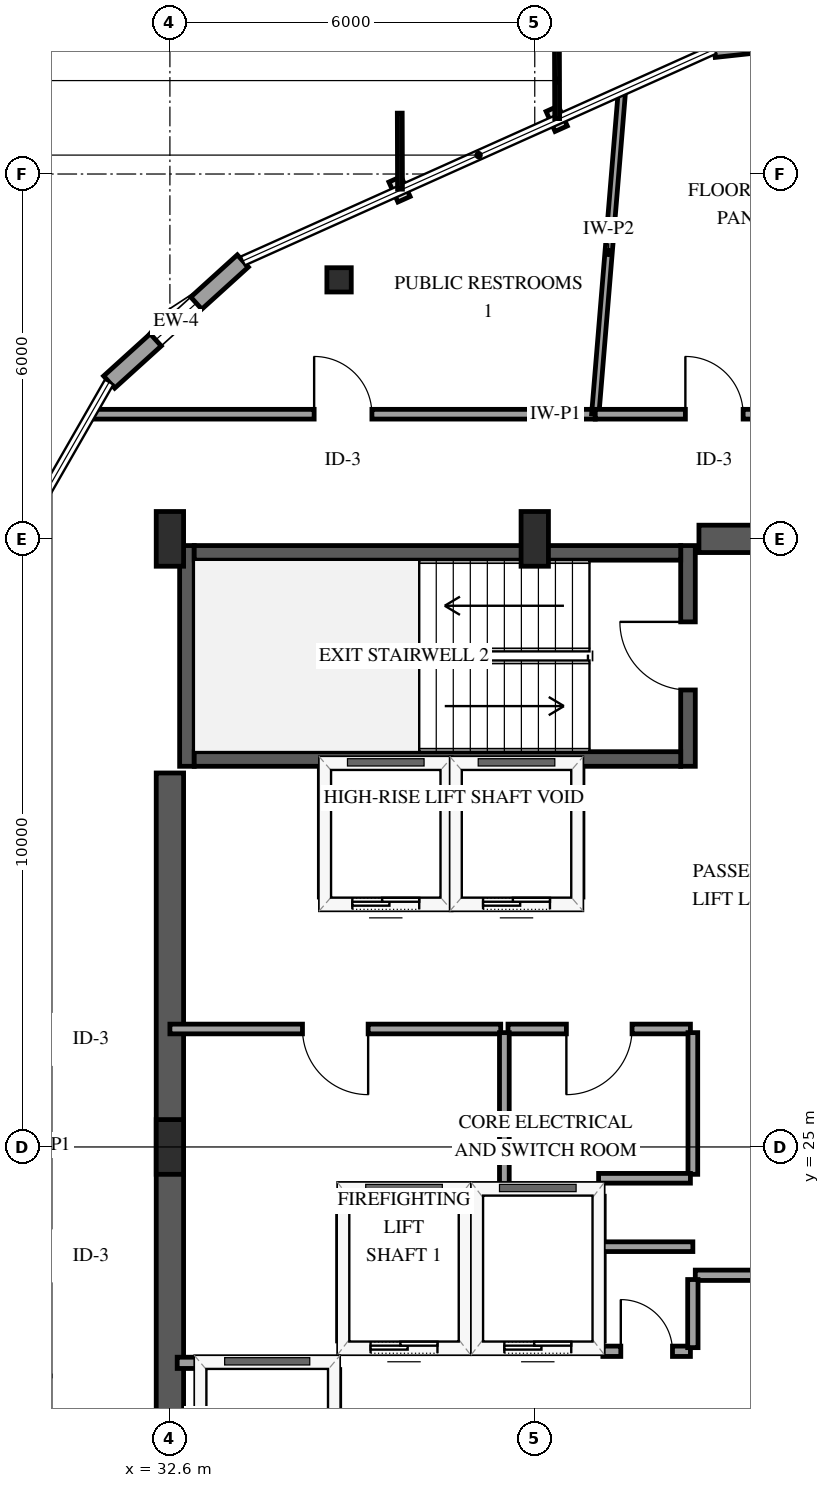
"""IFC4 building model, lengths in metres.
Left out: names, types, materials, properties, quantities, classifications, styles, units other than length and angle.
Written with IfcOpenShell. Run it as: python <this file> out.ifc"""

import sys

from ifc_helpers import new_model, si_unit, direction, frame, frame_2d, origin, origin_2d, place, context, subcontext, project, spatial, rectangle, i_section, extrude, element, fill, save


model = new_model("IFC4")
c1 = context("Model", 3, precision=1e-05, world=origin(), true_north=direction((0.0, 1.0)))
c2 = subcontext(c1, "Body", "Model", "MODEL_VIEW")
j1 = project(units=[si_unit("LENGTHUNIT", "METRE"), si_unit("PLANEANGLEUNIT", "RADIAN")], contexts=[c1])
p1 = place(None, origin())
s1 = spatial("IfcSite", under=j1, at=p1, CompositionType="ELEMENT")
p2 = place(p1, origin())
s2 = spatial("IfcBuilding", under=s1, at=p2, CompositionType="ELEMENT")
p3 = place(p2, frame((0.0, 0.0, 253.75)))
s3 = spatial("IfcBuildingStorey", under=s2, at=p3, CompositionType="ELEMENT", Elevation=253.75)
p4 = place(p3, frame((32.88, 31.26, 0.0), z_axis=(0.0, 0.0, 1.0), x_axis=(0.0, 1.0, 0.0)))
e1 = element("IfcWall", 1, at=p4, inside=s3, PredefinedType="SHEAR", context=c2, shape_type="SweptSolid", body=[
    extrude(rectangle(XDim=3.63, YDim=0.24, at=frame_2d((1.815, 0.0))), origin(), (0.0, 0.0, 1.0), 3.75),
])
p5 = place(p3, frame((41.12, 31.26, 0.0), z_axis=(0.0, 0.0, 1.0), x_axis=(0.0, 1.0, 0.0)))
e2 = element("IfcWall", 2, at=p5, inside=s3, PredefinedType="SHEAR", context=c2, shape_type="SweptSolid", body=[
    extrude(rectangle(XDim=3.63, YDim=0.24, at=frame_2d((1.815, 0.0))), origin(), (0.0, 0.0, 1.0), 3.75),
])
p6 = place(p5, frame((1.255, 0.0, 0.0)))
e3 = element("IfcOpeningElement", 3, at=p6, cuts=e2, PredefinedType="OPENING", context=c2, shape_type="SweptSolid", body=[
    extrude(rectangle(XDim=1.12, YDim=2.15, at=frame_2d((0.56, 1.075))), frame((0.0, 0.13, 0.0), z_axis=(0.0, -1.0, 0.0), x_axis=(1.0, 0.0, 0.0)), (0.0, 0.0, 1.0), 0.26),
])
for number, where, z_axis, x_axis in (
    (4, (33.0, 31.38, 0.0), (0.0, 0.0, 1.0), (1.0, 0.0, 0.0)),
    (5, (33.0, 34.77, 0.0), (0.0, 0.0, 1.0), (1.0, 0.0, 0.0)),
):
    element("IfcWall", number, at=place(p3, frame(where, z_axis=z_axis, x_axis=x_axis)), inside=s3, PredefinedType="SHEAR", context=c2, shape_type="SweptSolid", body=[
        extrude(rectangle(XDim=8.0, YDim=0.24, at=frame_2d((4.0, 0.0))), origin(), (0.0, 0.0, 1.0), 3.75),
    ])
p7 = place(p3, frame((32.6, 18.85, 0.0), z_axis=(0.0, 0.0, 1.0), x_axis=(0.0, 1.0, 0.0)))
e6 = element("IfcWall", 6, at=p7, inside=s3, PredefinedType="SHEAR", context=c2, shape_type="SweptSolid", body=[
    extrude(rectangle(XDim=12.3, YDim=0.45, at=frame_2d((6.15, 0.0))), origin(), (0.0, 0.0, 1.0), 3.75),
])
p8 = place(p3, frame((41.3, 35.0, 0.0), z_axis=(0.0, 0.0, 1.0), x_axis=(1.0, 0.0, 0.0)))
e7 = element("IfcWall", 7, at=p8, inside=s3, PredefinedType="SHEAR", context=c2, shape_type="SweptSolid", body=[
    extrude(rectangle(XDim=2.85, YDim=0.45, at=frame_2d((1.425, 0.0))), origin(), (0.0, 0.0, 1.0), 3.75),
])
for number, where, z_axis, x_axis in (
    (8, (32.6, 25.0, 0.0), (0.0, 0.0, 1.0), (1.0, 0.0, 0.0)),
    (9, (32.6, 35.0, 0.0), (0.0, 0.0, 1.0), (1.0, 0.0, 0.0)),
    (10, (38.6, 35.0, 0.0), (0.0, 0.0, 1.0), (1.0, 0.0, 0.0)),
):
    element("IfcColumn", number, at=place(p3, frame(where, z_axis=z_axis, x_axis=x_axis)), inside=s3, PredefinedType="PILASTER", context=c2, shape_type="SweptSolid", body=[
        extrude(rectangle(XDim=0.45, YDim=0.9, at=origin_2d()), origin(), (0.0, 0.0, 1.0), 3.75),
    ])
p9 = place(p3, frame((35.382, 39.26, 0.0), z_axis=(0.0, 0.0, 1.0), x_axis=(1.0, 0.0, 0.0)))
e11 = element("IfcColumn", 11, at=p9, inside=s3, PredefinedType="COLUMN", context=c2, shape_type="SweptSolid", body=[
    extrude(i_section(OverallWidth=0.401, OverallDepth=0.399, WebThickness=0.025, FlangeThickness=0.04, FilletRadius=0.038, at=origin_2d()), origin(), (0.0, 0.0, 1.0), 3.75),
])
p10 = place(p3, frame((44.503, 43.371, 0.0), z_axis=(0.0, 0.0, 1.0), x_axis=(-0.994188969029, -0.107648938037, 0.0)))
e12 = element("IfcWall", 12, at=p10, inside=s3, PredefinedType="SOLIDWALL", context=c2, shape_type="SweptSolid", body=[
    extrude(rectangle(XDim=2.967, YDim=0.27, at=frame_2d((1.483, 0.0))), origin(), (0.0, 0.0, 1.0), 2.829),
])
p11 = place(p10, frame((1.033, 0.0, 0.75)))
e13 = element("IfcOpeningElement", 13, at=p11, cuts=e12, PredefinedType="OPENING", context=c2, shape_type="SweptSolid", body=[
    extrude(rectangle(XDim=0.9, YDim=1.5, at=frame_2d((0.45, 0.75))), frame((0.0, 0.145, 0.0), z_axis=(0.0, -1.0, 0.0), x_axis=(1.0, 0.0, 0.0)), (0.0, 0.0, 1.0), 0.29),
])
p12 = place(p3, frame((33.799, 39.57, 0.0), z_axis=(0.0, 0.0, 1.0), x_axis=(-0.741022782564, -0.671479884822, 0.0)))
e14 = element("IfcWall", 14, at=p12, inside=s3, PredefinedType="SOLIDWALL", context=c2, shape_type="SweptSolid", body=[
    extrude(rectangle(XDim=2.967, YDim=0.27, at=frame_2d((1.483, 0.0))), origin(), (0.0, 0.0, 1.0), 2.829),
])
p13 = place(p12, frame((1.033, 0.0, 0.75)))
e15 = element("IfcOpeningElement", 15, at=p13, cuts=e14, PredefinedType="OPENING", context=c2, shape_type="SweptSolid", body=[
    extrude(rectangle(XDim=0.9, YDim=1.5, at=frame_2d((0.45, 0.75))), frame((0.0, 0.145, 0.0), z_axis=(0.0, -1.0, 0.0), x_axis=(1.0, 0.0, 0.0)), (0.0, 0.0, 1.0), 0.29),
])
p14 = place(p3, frame((35.45, 21.7, 0.0), z_axis=(0.0, 0.0, 1.0), x_axis=(1.0, 0.0, 0.0)))
e16 = element("IfcWall", 16, at=p14, inside=s3, PredefinedType="SOLIDWALL", context=c2, shape_type="SweptSolid", body=[
    extrude(rectangle(XDim=2.0, YDim=0.185, at=frame_2d((1.0, 0.0))), origin(), (0.0, 0.0, 1.0), 2.824),
])
p15 = place(p14, frame((0.45, 0.0, 0.0)))
e17 = element("IfcOpeningElement", 17, at=p15, cuts=e16, PredefinedType="OPENING", context=c2, shape_type="SweptSolid", body=[
    extrude(rectangle(XDim=1.1, YDim=2.15, at=frame_2d((0.55, 1.075))), frame((0.0, 0.103, 0.0), z_axis=(0.0, -1.0, 0.0), x_axis=(1.0, 0.0, 0.0)), (0.0, 0.0, 1.0), 0.205),
])
p16 = place(p3, frame((35.45, 24.3, 0.0), z_axis=(0.0, 0.0, 1.0), x_axis=(1.0, 0.0, 0.0)))
e18 = element("IfcWall", 18, at=p16, inside=s3, PredefinedType="SOLIDWALL", context=c2, shape_type="SweptSolid", body=[
    extrude(rectangle(XDim=2.0, YDim=0.185, at=frame_2d((1.0, 0.0))), origin(), (0.0, 0.0, 1.0), 2.824),
])
for number, where, z_axis, x_axis in (
    (19, (35.45, 21.81, 0.0), (0.0, 0.0, 1.0), (0.0, 1.0, 0.0)),
    (20, (37.45, 21.81, 0.0), (0.0, 0.0, 1.0), (0.0, 1.0, 0.0)),
):
    element("IfcWall", number, at=place(p3, frame(where, z_axis=z_axis, x_axis=x_axis)), inside=s3, PredefinedType="SOLIDWALL", context=c2, shape_type="SweptSolid", body=[
        extrude(rectangle(XDim=2.38, YDim=0.185, at=frame_2d((1.19, 0.0))), origin(), (0.0, 0.0, 1.0), 3.45),
    ])
p17 = place(p3, frame((37.65, 21.7, 0.0), z_axis=(0.0, 0.0, 1.0), x_axis=(1.0, 0.0, 0.0)))
e21 = element("IfcWall", 21, at=p17, inside=s3, PredefinedType="SOLIDWALL", context=c2, shape_type="SweptSolid", body=[
    extrude(rectangle(XDim=2.0, YDim=0.185, at=frame_2d((1.0, 0.0))), origin(), (0.0, 0.0, 1.0), 2.824),
])
p18 = place(p17, frame((0.45, 0.0, 0.0)))
e22 = element("IfcOpeningElement", 22, at=p18, cuts=e21, PredefinedType="OPENING", context=c2, shape_type="SweptSolid", body=[
    extrude(rectangle(XDim=1.1, YDim=2.15, at=frame_2d((0.55, 1.075))), frame((0.0, 0.103, 0.0), z_axis=(0.0, -1.0, 0.0), x_axis=(1.0, 0.0, 0.0)), (0.0, 0.0, 1.0), 0.205),
])
p19 = place(p3, frame((37.65, 24.3, 0.0), z_axis=(0.0, 0.0, 1.0), x_axis=(1.0, 0.0, 0.0)))
e23 = element("IfcWall", 23, at=p19, inside=s3, PredefinedType="SOLIDWALL", context=c2, shape_type="SweptSolid", body=[
    extrude(rectangle(XDim=2.0, YDim=0.185, at=frame_2d((1.0, 0.0))), origin(), (0.0, 0.0, 1.0), 2.824),
])
p20 = place(p3, frame((39.65, 21.81, 0.0), z_axis=(0.0, 0.0, 1.0), x_axis=(0.0, 1.0, 0.0)))
e24 = element("IfcWall", 24, at=p20, inside=s3, PredefinedType="SOLIDWALL", context=c2, shape_type="SweptSolid", body=[
    extrude(rectangle(XDim=2.38, YDim=0.185, at=frame_2d((1.19, 0.0))), origin(), (0.0, 0.0, 1.0), 3.45),
])
p21 = place(p3, frame((32.72, 21.45, 0.0), z_axis=(0.0, 0.0, 1.0), x_axis=(1.0, 0.0, 0.0)))
e25 = element("IfcWall", 25, at=p21, inside=s3, PredefinedType="SOLIDWALL", context=c2, shape_type="SweptSolid", body=[
    extrude(rectangle(XDim=2.58, YDim=0.185, at=frame_2d((1.29, 0.0))), origin(), (0.0, 0.0, 1.0), 2.824),
])
p22 = place(p3, frame((35.3, 18.79, 0.0), z_axis=(0.0, 0.0, 1.0), x_axis=(0.0, 1.0, 0.0)))
e26 = element("IfcWall", 26, at=p22, inside=s3, PredefinedType="SOLIDWALL", context=c2, shape_type="SweptSolid", body=[
    extrude(rectangle(XDim=2.55, YDim=0.185, at=frame_2d((1.275, 0.0))), origin(), (0.0, 0.0, 1.0), 3.45),
])
p23 = place(p22, frame((0.725, 0.0, 0.0)))
e27 = element("IfcOpeningElement", 27, at=p23, cuts=e26, PredefinedType="OPENING", context=c2, shape_type="SweptSolid", body=[
    extrude(rectangle(XDim=1.1, YDim=2.15, at=frame_2d((0.55, 1.075))), frame((0.0, 0.103, 0.0), z_axis=(0.0, -1.0, 0.0), x_axis=(1.0, 0.0, 0.0)), (0.0, 0.0, 1.0), 0.205),
])
p24 = place(p3, frame((35.15, 29.0, 0.0), z_axis=(0.0, 0.0, 1.0), x_axis=(1.0, 0.0, 0.0)))
e28 = element("IfcWall", 28, at=p24, inside=s3, PredefinedType="SOLIDWALL", context=c2, shape_type="SweptSolid", body=[
    extrude(rectangle(XDim=2.0, YDim=0.185, at=frame_2d((1.0, 0.0))), origin(), (0.0, 0.0, 1.0), 3.45),
])
p25 = place(p24, frame((0.45, 0.0, 0.0)))
e29 = element("IfcOpeningElement", 29, at=p25, cuts=e28, PredefinedType="OPENING", context=c2, shape_type="SweptSolid", body=[
    extrude(rectangle(XDim=1.1, YDim=2.15, at=frame_2d((0.55, 1.075))), frame((0.0, 0.103, 0.0), z_axis=(0.0, -1.0, 0.0), x_axis=(1.0, 0.0, 0.0)), (0.0, 0.0, 1.0), 0.205),
])
for number, where, z_axis, x_axis in (
    (30, (35.15, 29.11, 0.0), (0.0, 0.0, 1.0), (0.0, 1.0, 0.0)),
    (31, (37.15, 29.11, 0.0), (0.0, 0.0, 1.0), (0.0, 1.0, 0.0)),
):
    element("IfcWall", number, at=place(p3, frame(where, z_axis=z_axis, x_axis=x_axis)), inside=s3, PredefinedType="SOLIDWALL", context=c2, shape_type="SweptSolid", body=[
        extrude(rectangle(XDim=2.1, YDim=0.185, at=frame_2d((1.05, 0.0))), origin(), (0.0, 0.0, 1.0), 3.45),
    ])
p26 = place(p3, frame((37.3, 29.0, 0.0), z_axis=(0.0, 0.0, 1.0), x_axis=(1.0, 0.0, 0.0)))
e32 = element("IfcWall", 32, at=p26, inside=s3, PredefinedType="SOLIDWALL", context=c2, shape_type="SweptSolid", body=[
    extrude(rectangle(XDim=2.0, YDim=0.185, at=frame_2d((1.0, 0.0))), origin(), (0.0, 0.0, 1.0), 3.45),
])
p27 = place(p26, frame((0.45, 0.0, 0.0)))
e33 = element("IfcOpeningElement", 33, at=p27, cuts=e32, PredefinedType="OPENING", context=c2, shape_type="SweptSolid", body=[
    extrude(rectangle(XDim=1.1, YDim=2.15, at=frame_2d((0.55, 1.075))), frame((0.0, 0.103, 0.0), z_axis=(0.0, -1.0, 0.0), x_axis=(1.0, 0.0, 0.0)), (0.0, 0.0, 1.0), 0.205),
])
p28 = place(p3, frame((39.3, 29.11, 0.0), z_axis=(0.0, 0.0, 1.0), x_axis=(0.0, 1.0, 0.0)))
e34 = element("IfcWall", 34, at=p28, inside=s3, PredefinedType="SOLIDWALL", context=c2, shape_type="SweptSolid", body=[
    extrude(rectangle(XDim=2.1, YDim=0.185, at=frame_2d((1.05, 0.0))), origin(), (0.0, 0.0, 1.0), 3.45),
])
p29 = place(p3, frame((31.298, 37.05, 0.0), z_axis=(0.0, 0.0, 1.0), x_axis=(1.0, 0.0, 0.0)))
e35 = element("IfcWall", 35, at=p29, inside=s3, PredefinedType="PARTITIONING", context=c2, shape_type="SweptSolid", body=[
    extrude(rectangle(XDim=8.297, YDim=0.16, at=frame_2d((4.148, 0.0))), origin(), (0.0, 0.0, 1.0), 3.45),
])
p30 = place(p29, frame((3.674, 0.0, 0.0)))
e36 = element("IfcOpeningElement", 36, at=p30, cuts=e35, PredefinedType="OPENING", context=c2, shape_type="SweptSolid", body=[
    extrude(rectangle(XDim=0.95, YDim=2.15, at=frame_2d((0.475, 1.075))), frame((0.0, 0.09, 0.0), z_axis=(0.0, -1.0, 0.0), x_axis=(1.0, 0.0, 0.0)), (0.0, 0.0, 1.0), 0.18),
])
p31 = place(p3, frame((38.04, 26.94, 0.0), z_axis=(0.0, 0.0, 1.0), x_axis=(-1.0, 0.0, 0.0)))
e37 = element("IfcWall", 37, at=p31, inside=s3, PredefinedType="PARTITIONING", context=c2, shape_type="SweptSolid", body=[
    extrude(rectangle(XDim=5.44, YDim=0.16, at=frame_2d((2.72, 0.0))), origin(), (0.0, 0.0, 1.0), 3.45),
])
p32 = place(p31, frame((2.18, 0.0, 0.0)))
e38 = element("IfcOpeningElement", 38, at=p32, cuts=e37, PredefinedType="OPENING", context=c2, shape_type="SweptSolid", body=[
    extrude(rectangle(XDim=1.08, YDim=2.15, at=frame_2d((0.54, 1.075))), frame((0.0, 0.09, 0.0), z_axis=(0.0, -1.0, 0.0), x_axis=(1.0, 0.0, 0.0)), (0.0, 0.0, 1.0), 0.18),
])
p33 = place(p3, frame((39.595, 37.05, 0.0), z_axis=(0.0, 0.0, 1.0), x_axis=(0.082231683065, 0.996613240079, 0.0)))
e39 = element("IfcWall", 39, at=p33, inside=s3, PredefinedType="PARTITIONING", context=c2, shape_type="SweptSolid", body=[
    extrude(rectangle(XDim=5.338, YDim=0.12, at=frame_2d((2.669, 0.0))), origin(), (0.0, 0.0, 1.0), 3.45),
])
p34 = place(p3, frame((39.595, 37.05, 0.0), z_axis=(0.0, 0.0, 1.0), x_axis=(1.0, 0.0, 0.0)))
e40 = element("IfcWall", 40, at=p34, inside=s3, PredefinedType="PARTITIONING", context=c2, shape_type="SweptSolid", body=[
    extrude(rectangle(XDim=3.913, YDim=0.16, at=frame_2d((1.957, 0.0))), origin(), (0.0, 0.0, 1.0), 3.45),
])
p35 = place(p34, frame((1.482, 0.0, 0.0)))
e41 = element("IfcOpeningElement", 41, at=p35, cuts=e40, PredefinedType="OPENING", context=c2, shape_type="SweptSolid", body=[
    extrude(rectangle(XDim=0.95, YDim=2.15, at=frame_2d((0.475, 1.075))), frame((0.0, 0.09, 0.0), z_axis=(0.0, -1.0, 0.0), x_axis=(1.0, 0.0, 0.0)), (0.0, 0.0, 1.0), 0.18),
])
p36 = place(p3, frame((41.24, 22.89, 0.0), z_axis=(0.0, 0.0, 1.0), x_axis=(1.0, 0.0, 0.0)))
e42 = element("IfcWall", 42, at=p36, inside=s3, PredefinedType="PARTITIONING", context=c2, shape_type="SweptSolid", body=[
    extrude(rectangle(XDim=3.32, YDim=0.17, at=frame_2d((1.66, 0.0))), origin(), (0.0, 0.0, 1.0), 3.45),
])
p37 = place(p36, frame((1.12, 0.0, 0.0)))
e43 = element("IfcOpeningElement", 43, at=p37, cuts=e42, PredefinedType="OPENING", context=c2, shape_type="SweptSolid", body=[
    extrude(rectangle(XDim=1.08, YDim=2.15, at=frame_2d((0.54, 1.075))), frame((0.0, 0.095, 0.0), z_axis=(0.0, -1.0, 0.0), x_axis=(1.0, 0.0, 0.0)), (0.0, 0.0, 1.0), 0.19),
])
p38 = place(p3, frame((41.16, 26.94, 0.0), z_axis=(0.0, 0.0, 1.0), x_axis=(-1.0, 0.0, 0.0)))
e44 = element("IfcWall", 44, at=p38, inside=s3, PredefinedType="PARTITIONING", context=c2, shape_type="SweptSolid", body=[
    extrude(rectangle(XDim=3.0, YDim=0.16, at=frame_2d((1.5, 0.0))), origin(), (0.0, 0.0, 1.0), 3.45),
])
p39 = place(p38, frame((0.96, 0.0, 0.0)))
e45 = element("IfcOpeningElement", 45, at=p39, cuts=e44, PredefinedType="OPENING", context=c2, shape_type="SweptSolid", body=[
    extrude(rectangle(XDim=1.08, YDim=2.15, at=frame_2d((0.54, 1.075))), frame((0.0, 0.09, 0.0), z_axis=(0.0, -1.0, 0.0), x_axis=(1.0, 0.0, 0.0)), (0.0, 0.0, 1.0), 0.18),
])
p40 = place(p3, frame((38.1, 26.88, 0.0), z_axis=(0.0, 0.0, 1.0), x_axis=(0.0, -1.0, 0.0)))
e46 = element("IfcWall", 46, at=p40, inside=s3, PredefinedType="PARTITIONING", context=c2, shape_type="SweptSolid", body=[
    extrude(rectangle(XDim=2.58, YDim=0.16, at=frame_2d((1.29, 0.0))), origin(), (0.0, 0.0, 1.0), 3.45),
])
p41 = place(p3, frame((41.2, 24.55, 0.0), z_axis=(0.0, 0.0, 1.0), x_axis=(0.0, 1.0, 0.0)))
e47 = element("IfcWall", 47, at=p41, inside=s3, PredefinedType="PARTITIONING", context=c2, shape_type="SweptSolid", body=[
    extrude(rectangle(XDim=2.33, YDim=0.16, at=frame_2d((1.165, 0.0))), origin(), (0.0, 0.0, 1.0), 3.45),
])
p42 = place(p3, frame((39.65, 24.485, 0.0), z_axis=(0.0, 0.0, 1.0), x_axis=(1.0, 0.0, 0.0)))
e48 = element("IfcWall", 48, at=p42, inside=s3, PredefinedType="PARTITIONING", context=c2, shape_type="SweptSolid", body=[
    extrude(rectangle(XDim=1.51, YDim=0.16, at=frame_2d((0.755, 0.0))), origin(), (0.0, 0.0, 1.0), 2.824),
])
p43 = place(p3, frame((39.72, 21.64, 0.0), z_axis=(0.0, 0.0, 1.0), x_axis=(1.0, 0.0, 0.0)))
e49 = element("IfcWall", 49, at=p43, inside=s3, PredefinedType="PARTITIONING", context=c2, shape_type="SweptSolid", body=[
    extrude(rectangle(XDim=1.44, YDim=0.17, at=frame_2d((0.72, 0.0))), origin(), (0.0, 0.0, 1.0), 2.824),
])
p44 = place(p43, frame((0.295, 0.0, 0.0)))
e50 = element("IfcOpeningElement", 50, at=p44, cuts=e49, PredefinedType="OPENING", context=c2, shape_type="SweptSolid", body=[
    extrude(rectangle(XDim=0.85, YDim=2.1, at=frame_2d((0.425, 1.05))), frame((0.0, 0.095, 0.0), z_axis=(0.0, -1.0, 0.0), x_axis=(1.0, 0.0, 0.0)), (0.0, 0.0, 1.0), 0.19),
])
p45 = place(p3, frame((41.2, 21.7, 0.0), z_axis=(0.0, 0.0, 1.0), x_axis=(0.0, 1.0, 0.0)))
e51 = element("IfcWall", 51, at=p45, inside=s3, PredefinedType="PARTITIONING", context=c2, shape_type="SweptSolid", body=[
    extrude(rectangle(XDim=1.12, YDim=0.17, at=frame_2d((0.56, 0.0))), origin(), (0.0, 0.0, 1.0), 3.45),
])
p46 = place(p3, frame((41.2, 23.36, 0.0), z_axis=(0.0, 0.0, 1.0), x_axis=(-1.0, 0.0, 0.0)))
e52 = element("IfcWall", 52, at=p46, inside=s3, PredefinedType="PARTITIONING", context=c2, shape_type="SweptSolid", body=[
    extrude(rectangle(XDim=1.48, YDim=0.16, at=frame_2d((0.74, 0.0))), origin(), (0.0, 0.0, 1.0), 3.45),
])
p47 = place(p13, origin())
e53 = element("IfcWindow", 53, at=p47, inside=s3, PartitioningType="SINGLE_PANEL", PredefinedType="WINDOW", context=c2, shape_type="SweptSolid", body=[
    extrude(rectangle(XDim=0.9, YDim=1.5, at=frame_2d((0.45, 0.75))), frame((0.0, 0.03, 0.0), z_axis=(0.0, -1.0, 0.0), x_axis=(1.0, 0.0, 0.0)), (0.0, 0.0, 1.0), 0.06),
])
fill(e15, e53)
p48 = place(p15, origin())
e54 = element("IfcDoor", 54, at=p48, inside=s3, OperationType="SLIDING_TO_LEFT", PredefinedType="DOOR", context=c2, shape_type="SweptSolid", body=[
    extrude(rectangle(XDim=1.1, YDim=2.15, at=frame_2d((0.55, 1.075))), frame((0.0, 0.025, 0.0), z_axis=(0.0, -1.0, 0.0), x_axis=(1.0, 0.0, 0.0)), (0.0, 0.0, 1.0), 0.05),
])
fill(e17, e54)
p49 = place(p18, origin())
e55 = element("IfcDoor", 55, at=p49, inside=s3, OperationType="SLIDING_TO_LEFT", PredefinedType="DOOR", context=c2, shape_type="SweptSolid", body=[
    extrude(rectangle(XDim=1.1, YDim=2.15, at=frame_2d((0.55, 1.075))), frame((0.0, 0.025, 0.0), z_axis=(0.0, -1.0, 0.0), x_axis=(1.0, 0.0, 0.0)), (0.0, 0.0, 1.0), 0.05),
])
fill(e22, e55)
p50 = place(p25, origin())
e56 = element("IfcDoor", 56, at=p50, inside=s3, OperationType="SLIDING_TO_LEFT", PredefinedType="DOOR", context=c2, shape_type="SweptSolid", body=[
    extrude(rectangle(XDim=1.1, YDim=2.15, at=frame_2d((0.55, 1.075))), frame((0.0, 0.025, 0.0), z_axis=(0.0, -1.0, 0.0), x_axis=(1.0, 0.0, 0.0)), (0.0, 0.0, 1.0), 0.05),
])
fill(e29, e56)
p51 = place(p27, origin())
e57 = element("IfcDoor", 57, at=p51, inside=s3, OperationType="SLIDING_TO_LEFT", PredefinedType="DOOR", context=c2, shape_type="SweptSolid", body=[
    extrude(rectangle(XDim=1.1, YDim=2.15, at=frame_2d((0.55, 1.075))), frame((0.0, 0.025, 0.0), z_axis=(0.0, -1.0, 0.0), x_axis=(1.0, 0.0, 0.0)), (0.0, 0.0, 1.0), 0.05),
])
fill(e33, e57)
p52 = place(p6, origin())
e58 = element("IfcDoor", 58, at=p52, inside=s3, OperationType="SINGLE_SWING_RIGHT", PredefinedType="DOOR", context=c2, shape_type="SweptSolid", body=[
    extrude(rectangle(XDim=1.12, YDim=2.15, at=frame_2d((0.56, 1.075))), frame((0.0, 0.025, 0.0), z_axis=(0.0, -1.0, 0.0), x_axis=(1.0, 0.0, 0.0)), (0.0, 0.0, 1.0), 0.05),
])
fill(e3, e58)
p53 = place(p30, origin())
e59 = element("IfcDoor", 59, at=p53, inside=s3, OperationType="SINGLE_SWING_LEFT", PredefinedType="DOOR", context=c2, shape_type="SweptSolid", body=[
    extrude(rectangle(XDim=0.95, YDim=2.15, at=frame_2d((0.475, 1.075))), frame((0.0, 0.025, 0.0), z_axis=(0.0, -1.0, 0.0), x_axis=(1.0, 0.0, 0.0)), (0.0, 0.0, 1.0), 0.05),
])
fill(e36, e59)
p54 = place(p32, origin())
e60 = element("IfcDoor", 60, at=p54, inside=s3, OperationType="SINGLE_SWING_LEFT", PredefinedType="DOOR", context=c2, shape_type="SweptSolid", body=[
    extrude(rectangle(XDim=1.08, YDim=2.15, at=frame_2d((0.54, 1.075))), frame((0.0, 0.025, 0.0), z_axis=(0.0, -1.0, 0.0), x_axis=(1.0, 0.0, 0.0)), (0.0, 0.0, 1.0), 0.05),
])
fill(e38, e60)
p55 = place(p35, origin())
e61 = element("IfcDoor", 61, at=p55, inside=s3, OperationType="SINGLE_SWING_LEFT", PredefinedType="DOOR", context=c2, shape_type="SweptSolid", body=[
    extrude(rectangle(XDim=0.95, YDim=2.15, at=frame_2d((0.475, 1.075))), frame((0.0, 0.025, 0.0), z_axis=(0.0, -1.0, 0.0), x_axis=(1.0, 0.0, 0.0)), (0.0, 0.0, 1.0), 0.05),
])
fill(e41, e61)
p56 = place(p39, origin())
e62 = element("IfcDoor", 62, at=p56, inside=s3, OperationType="SINGLE_SWING_RIGHT", PredefinedType="DOOR", context=c2, shape_type="SweptSolid", body=[
    extrude(rectangle(XDim=1.08, YDim=2.15, at=frame_2d((0.54, 1.075))), frame((0.0, 0.025, 0.0), z_axis=(0.0, -1.0, 0.0), x_axis=(1.0, 0.0, 0.0)), (0.0, 0.0, 1.0), 0.05),
])
fill(e45, e62)
p57 = place(p44, origin())
e63 = element("IfcDoor", 63, at=p57, inside=s3, OperationType="SINGLE_SWING_LEFT", PredefinedType="DOOR", context=c2, shape_type="SweptSolid", body=[
    extrude(rectangle(XDim=0.85, YDim=2.1, at=frame_2d((0.425, 1.05))), frame((0.0, 0.025, 0.0), z_axis=(0.0, -1.0, 0.0), x_axis=(1.0, 0.0, 0.0)), (0.0, 0.0, 1.0), 0.05),
])
fill(e50, e63)
save(model, sys.argv[1])
